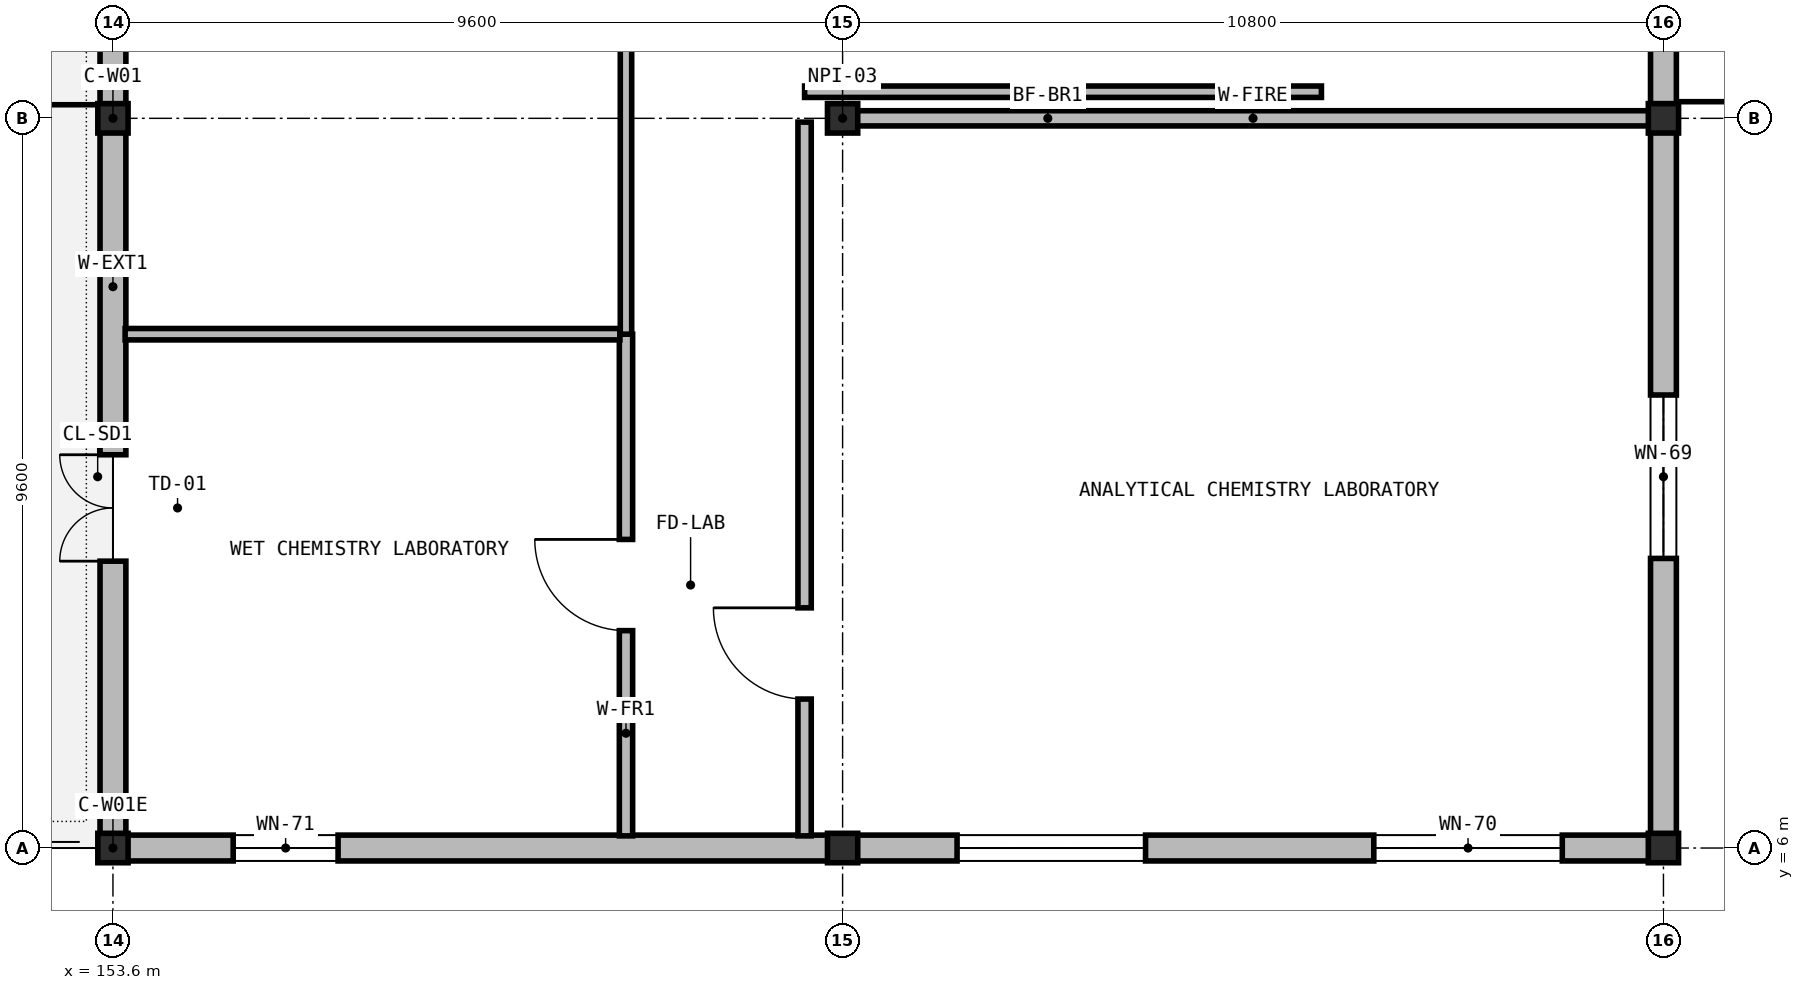
"""IFC4 building model, lengths in metres.
Left out: names, types, materials, properties, quantities, classifications, styles, units other than length and angle.
Written with IfcOpenShell. Run it as: python <this file> out.ifc"""

import sys

from ifc_helpers import new_model, si_unit, direction, frame, frame_2d, origin, origin_2d, place, context, subcontext, project, spatial, rectangle, i_section, extrude, element, fill, save


model = new_model("IFC4")
c1 = context("Model", 3, precision=1e-05, world=origin(), true_north=direction((0.0, 1.0)))
c2 = subcontext(c1, "Body", "Model", "MODEL_VIEW")
j1 = project(units=[si_unit("LENGTHUNIT", "METRE"), si_unit("PLANEANGLEUNIT", "RADIAN")], contexts=[c1])
p1 = place(None, origin())
s1 = spatial("IfcSite", under=j1, at=p1, CompositionType="ELEMENT")
p2 = place(p1, origin())
s2 = spatial("IfcBuilding", under=s1, at=p2, CompositionType="ELEMENT")
p3 = place(p2, frame((0.0, 0.0, 5.25)))
s3 = spatial("IfcBuildingStorey", under=s2, at=p3, CompositionType="ELEMENT", Elevation=5.25)
for number, where, z_axis, x_axis in (
    (1, (153.6, 6.0, 0.0), (0.0, 0.0, 1.0), (1.0, 0.0, 0.0)),
    (2, (153.6, 15.6, 0.0), (0.0, 0.0, 1.0), (1.0, 0.0, 0.0)),
    (3, (163.2, 6.0, 0.0), (0.0, 0.0, 1.0), (1.0, 0.0, 0.0)),
    (4, (163.2, 15.6, 0.0), (0.0, 0.0, 1.0), (1.0, 0.0, 0.0)),
    (5, (174.0, 6.0, 0.0), (0.0, 0.0, 1.0), (1.0, 0.0, 0.0)),
    (6, (174.0, 15.6, 0.0), (0.0, 0.0, 1.0), (1.0, 0.0, 0.0)),
):
    element("IfcColumn", number, at=place(p3, frame(where, z_axis=z_axis, x_axis=x_axis)), inside=s3, PredefinedType="COLUMN", context=c2, shape_type="SweptSolid", body=[
        extrude(i_section(OverallWidth=0.398, OverallDepth=0.387, WebThickness=0.024, FlangeThickness=0.039, at=origin_2d()), origin(), (0.0, 0.0, 1.0), 4.55),
    ])
p4 = place(p3, frame((153.6, 6.174, 0.0), z_axis=(0.0, 0.0, 1.0), x_axis=(0.0, 1.0, 0.0)))
e7 = element("IfcWall", 7, at=p4, inside=s3, PredefinedType="SOLIDWALL", context=c2, shape_type="SweptSolid", body=[
    extrude(rectangle(XDim=9.422, YDim=0.34, at=frame_2d((4.711, 0.0))), origin(), (0.0, 0.0, 1.0), 3.893),
])
p5 = place(p4, frame((3.6, 0.0, 0.0)))
e8 = element("IfcOpeningElement", 8, at=p5, cuts=e7, PredefinedType="OPENING", context=c2, shape_type="SweptSolid", body=[
    extrude(rectangle(XDim=1.4, YDim=2.2, at=frame_2d((0.7, 1.1))), frame((0.0, 0.18, 0.0), z_axis=(0.0, -1.0, 0.0), x_axis=(1.0, 0.0, 0.0)), (0.0, 0.0, 1.0), 0.36),
])
p6 = place(p3, frame((153.6, 15.604, 0.0), z_axis=(0.0, 0.0, 1.0), x_axis=(0.0, 1.0, 0.0)))
e9 = element("IfcWall", 9, at=p6, inside=s3, PredefinedType="SOLIDWALL", context=c2, shape_type="SweptSolid", body=[
    extrude(rectangle(XDim=9.592, YDim=0.34, at=frame_2d((4.796, 0.0))), origin(), (0.0, 0.0, 1.0), 3.893),
])
p7 = place(p6, frame((3.611, 0.0, 0.95)))
e10 = element("IfcOpeningElement", 10, at=p7, cuts=e9, PredefinedType="OPENING", context=c2, shape_type="SweptSolid", body=[
    extrude(rectangle(XDim=2.37, YDim=1.48, at=frame_2d((1.185, 0.74))), frame((0.0, 0.18, 0.0), z_axis=(0.0, -1.0, 0.0), x_axis=(1.0, 0.0, 0.0)), (0.0, 0.0, 1.0), 0.36),
])
p8 = place(p3, frame((174.0, 25.196, 0.0), z_axis=(0.0, 0.0, 1.0), x_axis=(0.0, -1.0, 0.0)))
e11 = element("IfcWall", 11, at=p8, inside=s3, PredefinedType="SOLIDWALL", context=c2, shape_type="SweptSolid", body=[
    extrude(rectangle(XDim=9.592, YDim=0.34, at=frame_2d((4.796, 0.0))), origin(), (0.0, 0.0, 1.0), 3.884),
])
p9 = place(p8, frame((3.886, 0.0, 0.95)))
e12 = element("IfcOpeningElement", 12, at=p9, cuts=e11, PredefinedType="OPENING", context=c2, shape_type="SweptSolid", body=[
    extrude(rectangle(XDim=1.82, YDim=1.72, at=frame_2d((0.91, 0.86))), frame((0.0, 0.18, 0.0), z_axis=(0.0, -1.0, 0.0), x_axis=(1.0, 0.0, 0.0)), (0.0, 0.0, 1.0), 0.36),
])
p10 = place(p3, frame((174.0, 15.596, 0.0), z_axis=(0.0, 0.0, 1.0), x_axis=(0.0, -1.0, 0.0)))
e13 = element("IfcWall", 13, at=p10, inside=s3, PredefinedType="SOLIDWALL", context=c2, shape_type="SweptSolid", body=[
    extrude(rectangle(XDim=9.422, YDim=0.34, at=frame_2d((4.711, 0.0))), origin(), (0.0, 0.0, 1.0), 3.884),
])
p11 = place(p10, frame((3.636, 0.0, 0.95)))
e14 = element("IfcOpeningElement", 14, at=p11, cuts=e13, PredefinedType="OPENING", context=c2, shape_type="SweptSolid", body=[
    extrude(rectangle(XDim=2.15, YDim=1.64, at=frame_2d((1.075, 0.82))), frame((0.0, 0.18, 0.0), z_axis=(0.0, -1.0, 0.0), x_axis=(1.0, 0.0, 0.0)), (0.0, 0.0, 1.0), 0.36),
])
p12 = place(p3, frame((174.17, 6.0, 0.0), z_axis=(0.0, 0.0, 1.0), x_axis=(-1.0, 0.0, 0.0)))
e15 = element("IfcWall", 15, at=p12, inside=s3, PredefinedType="SOLIDWALL", context=c2, shape_type="SweptSolid", body=[
    extrude(rectangle(XDim=10.966, YDim=0.34, at=frame_2d((5.483, 0.0))), origin(), (0.0, 0.0, 1.0), 3.815),
])
p13 = place(p12, frame((1.501, 0.0, 0.95)))
e16 = element("IfcOpeningElement", 16, at=p13, cuts=e15, PredefinedType="OPENING", context=c2, shape_type="SweptSolid", body=[
    extrude(rectangle(XDim=2.48, YDim=1.56, at=frame_2d((1.24, 0.78))), frame((0.0, 0.18, 0.0), z_axis=(0.0, -1.0, 0.0), x_axis=(1.0, 0.0, 0.0)), (0.0, 0.0, 1.0), 0.36),
])
p14 = place(p12, frame((6.984, 0.0, 0.95)))
e17 = element("IfcOpeningElement", 17, at=p14, cuts=e15, PredefinedType="OPENING", context=c2, shape_type="SweptSolid", body=[
    extrude(rectangle(XDim=2.48, YDim=1.56, at=frame_2d((1.24, 0.78))), frame((0.0, 0.18, 0.0), z_axis=(0.0, -1.0, 0.0), x_axis=(1.0, 0.0, 0.0)), (0.0, 0.0, 1.0), 0.36),
])
p15 = place(p3, frame((163.196, 6.0, 0.0), z_axis=(0.0, 0.0, 1.0), x_axis=(-1.0, 0.0, 0.0)))
e18 = element("IfcWall", 18, at=p15, inside=s3, PredefinedType="SOLIDWALL", context=c2, shape_type="SweptSolid", body=[
    extrude(rectangle(XDim=9.766, YDim=0.34, at=frame_2d((4.883, 0.0))), origin(), (0.0, 0.0, 1.0), 3.884),
])
p16 = place(p15, frame((6.634, 0.0, 0.95)))
e19 = element("IfcOpeningElement", 19, at=p16, cuts=e18, PredefinedType="OPENING", context=c2, shape_type="SweptSolid", body=[
    extrude(rectangle(XDim=1.38, YDim=1.4, at=frame_2d((0.69, 0.7))), frame((0.0, 0.18, 0.0), z_axis=(0.0, -1.0, 0.0), x_axis=(1.0, 0.0, 0.0)), (0.0, 0.0, 1.0), 0.36),
])
p17 = place(p3, frame((163.36, 15.6, 0.0), z_axis=(0.0, 0.0, 1.0), x_axis=(1.0, 0.0, 0.0)))
e20 = element("IfcWall", 20, at=p17, inside=s3, PredefinedType="SOLIDWALL", context=c2, shape_type="SweptSolid", body=[
    extrude(rectangle(XDim=10.48, YDim=0.2, at=frame_2d((5.24, 0.0))), origin(), (0.0, 0.0, 1.0), 3.737),
])
p18 = place(p3, frame((160.35, 6.16, 0.0), z_axis=(0.0, 0.0, 1.0), x_axis=(0.0, 1.0, 0.0)))
e21 = element("IfcWall", 21, at=p18, inside=s3, PredefinedType="PARTITIONING", context=c2, shape_type="SweptSolid", body=[
    extrude(rectangle(XDim=6.6, YDim=0.175, at=frame_2d((3.3, 0.0))), origin(), (0.0, 0.0, 1.0), 4.23),
])
p19 = place(p18, frame((2.7, 0.0, 0.0)))
e22 = element("IfcOpeningElement", 22, at=p19, cuts=e21, PredefinedType="OPENING", context=c2, shape_type="SweptSolid", body=[
    extrude(rectangle(XDim=1.2, YDim=2.2, at=frame_2d((0.6, 1.1))), frame((0.0, 0.097, 0.0), z_axis=(0.0, -1.0, 0.0), x_axis=(1.0, 0.0, 0.0)), (0.0, 0.0, 1.0), 0.195),
])
p20 = place(p3, frame((153.76, 12.76, 0.0), z_axis=(0.0, 0.0, 1.0), x_axis=(1.0, 0.0, 0.0)))
e23 = element("IfcWall", 23, at=p20, inside=s3, PredefinedType="PARTITIONING", context=c2, shape_type="SweptSolid", body=[
    extrude(rectangle(XDim=6.51, YDim=0.15, at=frame_2d((3.255, 0.0))), origin(), (0.0, 0.0, 1.0), 4.23),
])
p21 = place(p3, frame((160.35, 12.76, 0.0), z_axis=(0.0, 0.0, 1.0), x_axis=(0.0, 1.0, 0.0)))
e24 = element("IfcWall", 24, at=p21, inside=s3, PredefinedType="PARTITIONING", context=c2, shape_type="SweptSolid", body=[
    extrude(rectangle(XDim=9.8, YDim=0.15, at=frame_2d((4.9, 0.0))), origin(), (0.0, 0.0, 1.0), 4.23),
])
p22 = place(p21, frame((4.4, 0.0, 0.0)))
e25 = element("IfcOpeningElement", 25, at=p22, cuts=e24, PredefinedType="OPENING", context=c2, shape_type="SweptSolid", body=[
    extrude(rectangle(XDim=1.0, YDim=2.2, at=frame_2d((0.5, 1.1))), frame((0.0, 0.085, 0.0), z_axis=(0.0, -1.0, 0.0), x_axis=(1.0, 0.0, 0.0)), (0.0, 0.0, 1.0), 0.17),
])
p23 = place(p3, frame((162.7, 6.16, 0.0), z_axis=(0.0, 0.0, 1.0), x_axis=(0.0, 1.0, 0.0)))
e26 = element("IfcWall", 26, at=p23, inside=s3, PredefinedType="PARTITIONING", context=c2, shape_type="SweptSolid", body=[
    extrude(rectangle(XDim=9.39, YDim=0.175, at=frame_2d((4.695, 0.0))), origin(), (0.0, 0.0, 1.0), 4.23),
])
p24 = place(p23, frame((1.8, 0.0, 0.0)))
e27 = element("IfcOpeningElement", 27, at=p24, cuts=e26, PredefinedType="OPENING", context=c2, shape_type="SweptSolid", body=[
    extrude(rectangle(XDim=1.2, YDim=2.2, at=frame_2d((0.6, 1.1))), frame((0.0, 0.097, 0.0), z_axis=(0.0, -1.0, 0.0), x_axis=(1.0, 0.0, 0.0)), (0.0, 0.0, 1.0), 0.195),
])
p25 = place(p3, frame((162.7, 15.95, 0.0), z_axis=(0.0, 0.0, 1.0), x_axis=(1.0, 0.0, 0.0)))
e28 = element("IfcWall", 28, at=p25, inside=s3, PredefinedType="PARTITIONING", context=c2, shape_type="SweptSolid", body=[
    extrude(rectangle(XDim=6.8, YDim=0.15, at=frame_2d((3.4, 0.0))), origin(), (0.0, 0.0, 1.0), 4.23),
])
p26 = place(p5, origin())
e29 = element("IfcDoor", 29, at=p26, inside=s3, OperationType="DOUBLE_DOOR_SINGLE_SWING", PredefinedType="DOOR", context=c2, shape_type="SweptSolid", body=[
    extrude(rectangle(XDim=1.4, YDim=2.2, at=frame_2d((0.7, 1.1))), frame((0.0, 0.025, 0.0), z_axis=(0.0, -1.0, 0.0), x_axis=(1.0, 0.0, 0.0)), (0.0, 0.0, 1.0), 0.05),
])
fill(e8, e29)
p27 = place(p11, origin())
e30 = element("IfcWindow", 30, at=p27, inside=s3, PartitioningType="SINGLE_PANEL", PredefinedType="WINDOW", context=c2, shape_type="SweptSolid", body=[
    extrude(rectangle(XDim=2.15, YDim=1.64, at=frame_2d((1.075, 0.82))), frame((0.0, 0.03, 0.0), z_axis=(0.0, -1.0, 0.0), x_axis=(1.0, 0.0, 0.0)), (0.0, 0.0, 1.0), 0.06),
])
fill(e14, e30)
p28 = place(p13, origin())
e31 = element("IfcWindow", 31, at=p28, inside=s3, PartitioningType="SINGLE_PANEL", PredefinedType="WINDOW", context=c2, shape_type="SweptSolid", body=[
    extrude(rectangle(XDim=2.48, YDim=1.56, at=frame_2d((1.24, 0.78))), frame((0.0, 0.03, 0.0), z_axis=(0.0, -1.0, 0.0), x_axis=(1.0, 0.0, 0.0)), (0.0, 0.0, 1.0), 0.06),
])
fill(e16, e31)
p29 = place(p14, origin())
e32 = element("IfcWindow", 32, at=p29, inside=s3, PartitioningType="SINGLE_PANEL", PredefinedType="WINDOW", context=c2, shape_type="SweptSolid", body=[
    extrude(rectangle(XDim=2.48, YDim=1.56, at=frame_2d((1.24, 0.78))), frame((0.0, 0.03, 0.0), z_axis=(0.0, -1.0, 0.0), x_axis=(1.0, 0.0, 0.0)), (0.0, 0.0, 1.0), 0.06),
])
fill(e17, e32)
p30 = place(p16, origin())
e33 = element("IfcWindow", 33, at=p30, inside=s3, PartitioningType="SINGLE_PANEL", PredefinedType="WINDOW", context=c2, shape_type="SweptSolid", body=[
    extrude(rectangle(XDim=1.38, YDim=1.4, at=frame_2d((0.69, 0.7))), frame((0.0, 0.03, 0.0), z_axis=(0.0, -1.0, 0.0), x_axis=(1.0, 0.0, 0.0)), (0.0, 0.0, 1.0), 0.06),
])
fill(e19, e33)
p31 = place(p19, origin())
e34 = element("IfcDoor", 34, at=p31, inside=s3, OperationType="SINGLE_SWING_RIGHT", PredefinedType="DOOR", context=c2, shape_type="SweptSolid", body=[
    extrude(rectangle(XDim=1.2, YDim=2.2, at=frame_2d((0.6, 1.1))), frame((0.0, 0.025, 0.0), z_axis=(0.0, -1.0, 0.0), x_axis=(1.0, 0.0, 0.0)), (0.0, 0.0, 1.0), 0.05),
])
fill(e22, e34)
p32 = place(p24, origin())
e35 = element("IfcDoor", 35, at=p32, inside=s3, OperationType="SINGLE_SWING_RIGHT", PredefinedType="DOOR", context=c2, shape_type="SweptSolid", body=[
    extrude(rectangle(XDim=1.2, YDim=2.2, at=frame_2d((0.6, 1.1))), frame((0.0, 0.025, 0.0), z_axis=(0.0, -1.0, 0.0), x_axis=(1.0, 0.0, 0.0)), (0.0, 0.0, 1.0), 0.05),
])
fill(e27, e35)
save(model, sys.argv[1])
